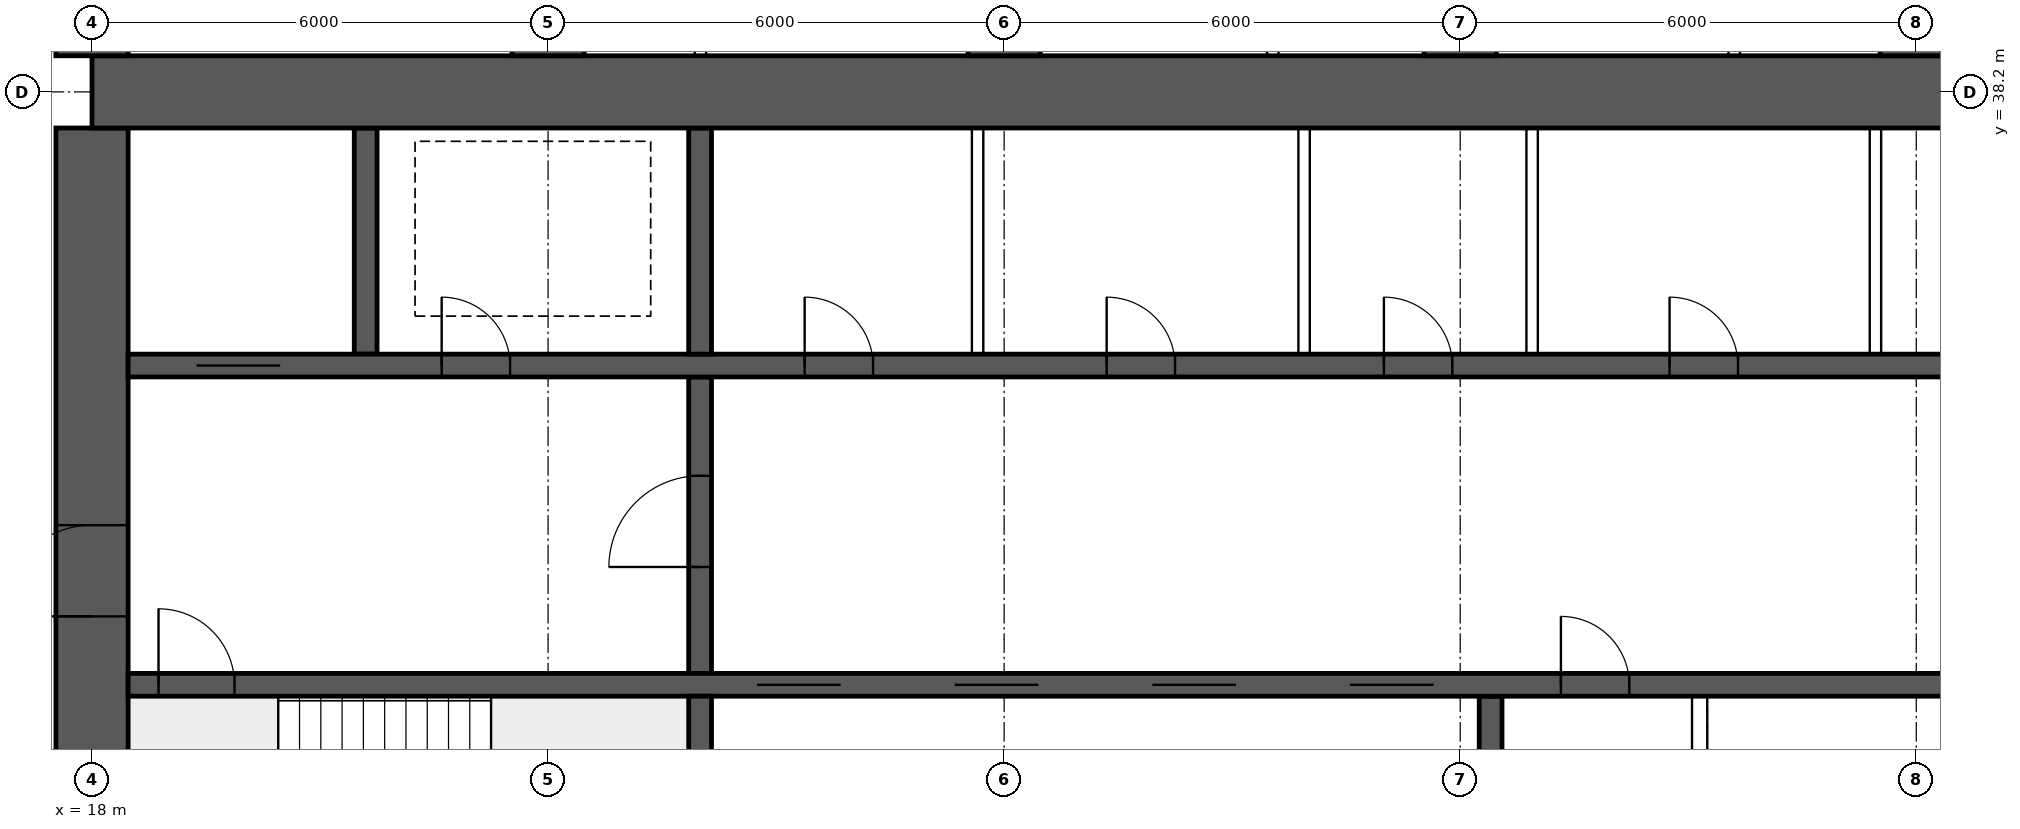
"""IFC4 building model, lengths in metres.
Left out: names, types, materials, properties, quantities, classifications, styles, units other than length and angle.
Written with IfcOpenShell. Run it as: python <this file> out.ifc"""

import sys

from ifc_helpers import new_model, si_unit, direction, frame, frame_2d, origin, place, context, subcontext, project, spatial, rectangle, extrude, element, fill, save


model = new_model("IFC4")
c1 = context("Model", 3, precision=1e-05, world=origin(), true_north=direction((0.0, 1.0)))
c2 = subcontext(c1, "Body", "Model", "MODEL_VIEW")
j1 = project(units=[si_unit("LENGTHUNIT", "METRE"), si_unit("PLANEANGLEUNIT", "RADIAN")], contexts=[c1])
p1 = place(None, origin())
s1 = spatial("IfcSite", under=j1, at=p1, CompositionType="ELEMENT")
p2 = place(p1, origin())
s2 = spatial("IfcBuilding", under=s1, at=p2, CompositionType="ELEMENT")
p3 = place(p2, frame((0.0, 0.0, 125.65)))
s3 = spatial("IfcBuildingStorey", under=s2, at=p3, CompositionType="ELEMENT", Elevation=125.65)
p4 = place(p3, frame((18.0, 38.2, 0.0), z_axis=(0.0, 0.0, 1.0), x_axis=(1.0, 0.0, 0.0)))
e1 = element("IfcWall", 1, at=p4, inside=s3, PredefinedType="SHEAR", context=c2, shape_type="SweptSolid", body=[
    extrude(rectangle(XDim=48.0, YDim=0.95, at=frame_2d((24.0, 0.0))), origin(), (0.0, 0.0, 1.0), 3.75),
])
p5 = place(p3, frame((18.0, 26.275, 0.0), z_axis=(0.0, 0.0, 1.0), x_axis=(0.0, 1.0, 0.0)))
e2 = element("IfcWall", 2, at=p5, inside=s3, PredefinedType="SHEAR", context=c2, shape_type="SweptSolid", body=[
    extrude(rectangle(XDim=11.45, YDim=0.95, at=frame_2d((5.725, 0.0))), origin(), (0.0, 0.0, 1.0), 3.75),
])
p6 = place(p5, frame((5.025, 0.0, 0.0)))
e3 = element("IfcOpeningElement", 3, at=p6, cuts=e2, PredefinedType="OPENING", context=c2, shape_type="SweptSolid", body=[
    extrude(rectangle(XDim=1.2, YDim=2.1, at=frame_2d((0.6, 1.05))), frame((0.0, 0.485, 0.0), z_axis=(0.0, -1.0, 0.0), x_axis=(1.0, 0.0, 0.0)), (0.0, 0.0, 1.0), 0.97),
])
p7 = place(p3, frame((18.475, 30.4, 0.0), z_axis=(0.0, 0.0, 1.0), x_axis=(1.0, 0.0, 0.0)))
e4 = element("IfcWall", 4, at=p7, inside=s3, PredefinedType="SHEAR", context=c2, shape_type="SweptSolid", body=[
    extrude(rectangle(XDim=47.05, YDim=0.3, at=frame_2d((23.525, 0.0))), origin(), (0.0, 0.0, 1.0), 3.75),
])
p8 = place(p7, frame((0.4, 0.0, 0.0)))
e5 = element("IfcOpeningElement", 5, at=p8, cuts=e4, PredefinedType="OPENING", context=c2, shape_type="SweptSolid", body=[
    extrude(rectangle(XDim=1.0, YDim=2.1, at=frame_2d((0.5, 1.05))), frame((0.0, 0.16, 0.0), z_axis=(0.0, -1.0, 0.0), x_axis=(1.0, 0.0, 0.0)), (0.0, 0.0, 1.0), 0.32),
])
p9 = place(p7, frame((45.65, 0.0, 0.0)))
e6 = element("IfcOpeningElement", 6, at=p9, cuts=e4, PredefinedType="OPENING", context=c2, shape_type="SweptSolid", body=[
    extrude(rectangle(XDim=1.0, YDim=2.1, at=frame_2d((0.5, 1.05))), frame((0.0, 0.16, 0.0), z_axis=(0.0, -1.0, 0.0), x_axis=(1.0, 0.0, 0.0)), (0.0, 0.0, 1.0), 0.32),
])
p10 = place(p7, frame((8.275, 0.0, 0.0)))
e7 = element("IfcOpeningElement", 7, at=p10, cuts=e4, PredefinedType="OPENING", context=c2, shape_type="SweptSolid", body=[
    extrude(rectangle(XDim=1.1, YDim=2.1, at=frame_2d((0.55, 1.05))), frame((0.0, 0.16, 0.0), z_axis=(0.0, -1.0, 0.0), x_axis=(1.0, 0.0, 0.0)), (0.0, 0.0, 1.0), 0.32),
])
p11 = place(p7, frame((10.875, 0.0, 0.0)))
e8 = element("IfcOpeningElement", 8, at=p11, cuts=e4, PredefinedType="OPENING", context=c2, shape_type="SweptSolid", body=[
    extrude(rectangle(XDim=1.1, YDim=2.1, at=frame_2d((0.55, 1.05))), frame((0.0, 0.16, 0.0), z_axis=(0.0, -1.0, 0.0), x_axis=(1.0, 0.0, 0.0)), (0.0, 0.0, 1.0), 0.32),
])
p12 = place(p7, frame((13.475, 0.0, 0.0)))
e9 = element("IfcOpeningElement", 9, at=p12, cuts=e4, PredefinedType="OPENING", context=c2, shape_type="SweptSolid", body=[
    extrude(rectangle(XDim=1.1, YDim=2.1, at=frame_2d((0.55, 1.05))), frame((0.0, 0.16, 0.0), z_axis=(0.0, -1.0, 0.0), x_axis=(1.0, 0.0, 0.0)), (0.0, 0.0, 1.0), 0.32),
])
p13 = place(p7, frame((16.075, 0.0, 0.0)))
e10 = element("IfcOpeningElement", 10, at=p13, cuts=e4, PredefinedType="OPENING", context=c2, shape_type="SweptSolid", body=[
    extrude(rectangle(XDim=1.1, YDim=2.1, at=frame_2d((0.55, 1.05))), frame((0.0, 0.16, 0.0), z_axis=(0.0, -1.0, 0.0), x_axis=(1.0, 0.0, 0.0)), (0.0, 0.0, 1.0), 0.32),
])
p14 = place(p7, frame((18.85, 0.0, 0.0)))
e11 = element("IfcOpeningElement", 11, at=p14, cuts=e4, PredefinedType="OPENING", context=c2, shape_type="SweptSolid", body=[
    extrude(rectangle(XDim=0.9, YDim=2.1, at=frame_2d((0.45, 1.05))), frame((0.0, 0.16, 0.0), z_axis=(0.0, -1.0, 0.0), x_axis=(1.0, 0.0, 0.0)), (0.0, 0.0, 1.0), 0.32),
])
p15 = place(p7, frame((30.142, 0.0, 0.0)))
e12 = element("IfcOpeningElement", 12, at=p15, cuts=e4, PredefinedType="OPENING", context=c2, shape_type="SweptSolid", body=[
    extrude(rectangle(XDim=1.1, YDim=2.1, at=frame_2d((0.55, 1.05))), frame((0.0, 0.16, 0.0), z_axis=(0.0, -1.0, 0.0), x_axis=(1.0, 0.0, 0.0)), (0.0, 0.0, 1.0), 0.32),
])
p16 = place(p7, frame((33.675, 0.0, 0.0)))
e13 = element("IfcOpeningElement", 13, at=p16, cuts=e4, PredefinedType="OPENING", context=c2, shape_type="SweptSolid", body=[
    extrude(rectangle(XDim=1.1, YDim=2.1, at=frame_2d((0.55, 1.05))), frame((0.0, 0.16, 0.0), z_axis=(0.0, -1.0, 0.0), x_axis=(1.0, 0.0, 0.0)), (0.0, 0.0, 1.0), 0.32),
])
p17 = place(p7, frame((37.208, 0.0, 0.0)))
e14 = element("IfcOpeningElement", 14, at=p17, cuts=e4, PredefinedType="OPENING", context=c2, shape_type="SweptSolid", body=[
    extrude(rectangle(XDim=1.1, YDim=2.1, at=frame_2d((0.55, 1.05))), frame((0.0, 0.16, 0.0), z_axis=(0.0, -1.0, 0.0), x_axis=(1.0, 0.0, 0.0)), (0.0, 0.0, 1.0), 0.32),
])
p18 = place(p3, frame((18.475, 34.6, 0.0), z_axis=(0.0, 0.0, 1.0), x_axis=(1.0, 0.0, 0.0)))
e15 = element("IfcWall", 15, at=p18, inside=s3, PredefinedType="SHEAR", context=c2, shape_type="SweptSolid", body=[
    extrude(rectangle(XDim=47.05, YDim=0.3, at=frame_2d((23.525, 0.0))), origin(), (0.0, 0.0, 1.0), 3.75),
])
p19 = place(p18, frame((0.9, 0.0, 0.0)))
e16 = element("IfcOpeningElement", 16, at=p19, cuts=e15, PredefinedType="OPENING", context=c2, shape_type="SweptSolid", body=[
    extrude(rectangle(XDim=1.1, YDim=2.1, at=frame_2d((0.55, 1.05))), frame((0.0, 0.16, 0.0), z_axis=(0.0, -1.0, 0.0), x_axis=(1.0, 0.0, 0.0)), (0.0, 0.0, 1.0), 0.32),
])
p20 = place(p18, frame((45.05, 0.0, 0.0)))
e17 = element("IfcOpeningElement", 17, at=p20, cuts=e15, PredefinedType="OPENING", context=c2, shape_type="SweptSolid", body=[
    extrude(rectangle(XDim=1.1, YDim=2.1, at=frame_2d((0.55, 1.05))), frame((0.0, 0.16, 0.0), z_axis=(0.0, -1.0, 0.0), x_axis=(1.0, 0.0, 0.0)), (0.0, 0.0, 1.0), 0.32),
])
p21 = place(p18, frame((4.125, 0.0, 0.0)))
e18 = element("IfcOpeningElement", 18, at=p21, cuts=e15, PredefinedType="OPENING", context=c2, shape_type="SweptSolid", body=[
    extrude(rectangle(XDim=0.9, YDim=2.1, at=frame_2d((0.45, 1.05))), frame((0.0, 0.16, 0.0), z_axis=(0.0, -1.0, 0.0), x_axis=(1.0, 0.0, 0.0)), (0.0, 0.0, 1.0), 0.32),
])
p22 = place(p18, frame((42.025, 0.0, 0.0)))
e19 = element("IfcOpeningElement", 19, at=p22, cuts=e15, PredefinedType="OPENING", context=c2, shape_type="SweptSolid", body=[
    extrude(rectangle(XDim=0.9, YDim=2.1, at=frame_2d((0.45, 1.05))), frame((0.0, 0.16, 0.0), z_axis=(0.0, -1.0, 0.0), x_axis=(1.0, 0.0, 0.0)), (0.0, 0.0, 1.0), 0.32),
])
p23 = place(p18, frame((8.9, 0.0, 0.0)))
e20 = element("IfcOpeningElement", 20, at=p23, cuts=e15, PredefinedType="OPENING", context=c2, shape_type="SweptSolid", body=[
    extrude(rectangle(XDim=0.9, YDim=2.1, at=frame_2d((0.45, 1.05))), frame((0.0, 0.16, 0.0), z_axis=(0.0, -1.0, 0.0), x_axis=(1.0, 0.0, 0.0)), (0.0, 0.0, 1.0), 0.32),
])
p24 = place(p18, frame((12.874, 0.0, 0.0)))
e21 = element("IfcOpeningElement", 21, at=p24, cuts=e15, PredefinedType="OPENING", context=c2, shape_type="SweptSolid", body=[
    extrude(rectangle(XDim=0.9, YDim=2.1, at=frame_2d((0.45, 1.05))), frame((0.0, 0.16, 0.0), z_axis=(0.0, -1.0, 0.0), x_axis=(1.0, 0.0, 0.0)), (0.0, 0.0, 1.0), 0.32),
])
p25 = place(p18, frame((16.521, 0.0, 0.0)))
e22 = element("IfcOpeningElement", 22, at=p25, cuts=e15, PredefinedType="OPENING", context=c2, shape_type="SweptSolid", body=[
    extrude(rectangle(XDim=0.9, YDim=2.1, at=frame_2d((0.45, 1.05))), frame((0.0, 0.16, 0.0), z_axis=(0.0, -1.0, 0.0), x_axis=(1.0, 0.0, 0.0)), (0.0, 0.0, 1.0), 0.32),
])
p26 = place(p18, frame((20.28, 0.0, 0.0)))
e23 = element("IfcOpeningElement", 23, at=p26, cuts=e15, PredefinedType="OPENING", context=c2, shape_type="SweptSolid", body=[
    extrude(rectangle(XDim=0.9, YDim=2.1, at=frame_2d((0.45, 1.05))), frame((0.0, 0.16, 0.0), z_axis=(0.0, -1.0, 0.0), x_axis=(1.0, 0.0, 0.0)), (0.0, 0.0, 1.0), 0.32),
])
p27 = place(p18, frame((24.686, 0.0, 0.0)))
e24 = element("IfcOpeningElement", 24, at=p27, cuts=e15, PredefinedType="OPENING", context=c2, shape_type="SweptSolid", body=[
    extrude(rectangle(XDim=0.9, YDim=2.1, at=frame_2d((0.45, 1.05))), frame((0.0, 0.16, 0.0), z_axis=(0.0, -1.0, 0.0), x_axis=(1.0, 0.0, 0.0)), (0.0, 0.0, 1.0), 0.32),
])
p28 = place(p18, frame((27.483, 0.0, 0.0)))
e25 = element("IfcOpeningElement", 25, at=p28, cuts=e15, PredefinedType="OPENING", context=c2, shape_type="SweptSolid", body=[
    extrude(rectangle(XDim=0.9, YDim=2.1, at=frame_2d((0.45, 1.05))), frame((0.0, 0.16, 0.0), z_axis=(0.0, -1.0, 0.0), x_axis=(1.0, 0.0, 0.0)), (0.0, 0.0, 1.0), 0.32),
])
p29 = place(p18, frame((29.45, 0.0, 0.0)))
e26 = element("IfcOpeningElement", 26, at=p29, cuts=e15, PredefinedType="OPENING", context=c2, shape_type="SweptSolid", body=[
    extrude(rectangle(XDim=0.9, YDim=2.1, at=frame_2d((0.45, 1.05))), frame((0.0, 0.16, 0.0), z_axis=(0.0, -1.0, 0.0), x_axis=(1.0, 0.0, 0.0)), (0.0, 0.0, 1.0), 0.32),
])
p30 = place(p18, frame((31.882, 0.0, 0.0)))
e27 = element("IfcOpeningElement", 27, at=p30, cuts=e15, PredefinedType="OPENING", context=c2, shape_type="SweptSolid", body=[
    extrude(rectangle(XDim=0.9, YDim=2.1, at=frame_2d((0.45, 1.05))), frame((0.0, 0.16, 0.0), z_axis=(0.0, -1.0, 0.0), x_axis=(1.0, 0.0, 0.0)), (0.0, 0.0, 1.0), 0.32),
])
p31 = place(p18, frame((34.617, 0.0, 0.0)))
e28 = element("IfcOpeningElement", 28, at=p31, cuts=e15, PredefinedType="OPENING", context=c2, shape_type="SweptSolid", body=[
    extrude(rectangle(XDim=0.9, YDim=2.1, at=frame_2d((0.45, 1.05))), frame((0.0, 0.16, 0.0), z_axis=(0.0, -1.0, 0.0), x_axis=(1.0, 0.0, 0.0)), (0.0, 0.0, 1.0), 0.32),
])
p32 = place(p18, frame((37.656, 0.0, 0.0)))
e29 = element("IfcOpeningElement", 29, at=p32, cuts=e15, PredefinedType="OPENING", context=c2, shape_type="SweptSolid", body=[
    extrude(rectangle(XDim=0.9, YDim=2.1, at=frame_2d((0.45, 1.05))), frame((0.0, 0.16, 0.0), z_axis=(0.0, -1.0, 0.0), x_axis=(1.0, 0.0, 0.0)), (0.0, 0.0, 1.0), 0.32),
])
p33 = place(p3, frame((26.0, 26.275, 0.0), z_axis=(0.0, 0.0, 1.0), x_axis=(0.0, 1.0, 0.0)))
e30 = element("IfcWall", 30, at=p33, inside=s3, PredefinedType="SHEAR", context=c2, shape_type="SweptSolid", body=[
    extrude(rectangle(XDim=3.975, YDim=0.3, at=frame_2d((1.988, 0.0))), origin(), (0.0, 0.0, 1.0), 3.75),
])
p34 = place(p3, frame((26.0, 30.55, 0.0), z_axis=(0.0, 0.0, 1.0), x_axis=(0.0, 1.0, 0.0)))
e31 = element("IfcWall", 31, at=p34, inside=s3, PredefinedType="SHEAR", context=c2, shape_type="SweptSolid", body=[
    extrude(rectangle(XDim=3.9, YDim=0.3, at=frame_2d((1.95, 0.0))), origin(), (0.0, 0.0, 1.0), 3.75),
])
p35 = place(p34, frame((1.4, 0.0, 0.0)))
e32 = element("IfcOpeningElement", 32, at=p35, cuts=e31, PredefinedType="OPENING", context=c2, shape_type="SweptSolid", body=[
    extrude(rectangle(XDim=1.2, YDim=2.1, at=frame_2d((0.6, 1.05))), frame((0.0, 0.16, 0.0), z_axis=(0.0, -1.0, 0.0), x_axis=(1.0, 0.0, 0.0)), (0.0, 0.0, 1.0), 0.32),
])
for number, where, z_axis, x_axis in (
    (33, (21.6, 34.75, 0.0), (0.0, 0.0, 1.0), (0.0, 1.0, 0.0)),
    (34, (26.0, 34.75, 0.0), (0.0, 0.0, 1.0), (0.0, 1.0, 0.0)),
):
    element("IfcWall", number, at=place(p3, frame(where, z_axis=z_axis, x_axis=x_axis)), inside=s3, PredefinedType="SHEAR", context=c2, shape_type="SweptSolid", body=[
        extrude(rectangle(XDim=2.975, YDim=0.3, at=frame_2d((1.488, 0.0))), origin(), (0.0, 0.0, 1.0), 3.75),
    ])
p36 = place(p3, frame((36.4, 26.275, 0.0), z_axis=(0.0, 0.0, 1.0), x_axis=(0.0, 1.0, 0.0)))
e35 = element("IfcWall", 35, at=p36, inside=s3, PredefinedType="SHEAR", context=c2, shape_type="SweptSolid", body=[
    extrude(rectangle(XDim=3.975, YDim=0.3, at=frame_2d((1.988, 0.0))), origin(), (0.0, 0.0, 1.0), 3.75),
])
for number, where, z_axis, x_axis in (
    (36, (18.0, 38.675, 0.0), (0.0, 0.0, 1.0), (0.0, 1.0, 0.0)),
    (37, (24.0, 38.675, 0.0), (0.0, 0.0, 1.0), (0.0, 1.0, 0.0)),
    (38, (30.0, 38.675, 0.0), (0.0, 0.0, 1.0), (0.0, 1.0, 0.0)),
    (39, (36.0, 38.675, 0.0), (0.0, 0.0, 1.0), (0.0, 1.0, 0.0)),
    (40, (42.0, 38.675, 0.0), (0.0, 0.0, 1.0), (0.0, 1.0, 0.0)),
):
    element("IfcWall", number, at=place(p3, frame(where, z_axis=z_axis, x_axis=x_axis)), inside=s3, PredefinedType="SHEAR", context=c2, shape_type="SweptSolid", body=[
        extrude(rectangle(XDim=9.325, YDim=0.95, at=frame_2d((4.663, 0.0))), origin(), (0.0, 0.0, 1.0), 3.75),
    ])
for number, where, z_axis, x_axis in (
    (41, (29.651, 34.75, 0.0), (0.0, 0.0, 1.0), (0.0, 1.0, 0.0)),
    (42, (33.946, 34.75, 0.0), (0.0, 0.0, 1.0), (0.0, 1.0, 0.0)),
    (43, (36.946, 34.75, 0.0), (0.0, 0.0, 1.0), (0.0, 1.0, 0.0)),
    (44, (41.463, 34.75, 0.0), (0.0, 0.0, 1.0), (0.0, 1.0, 0.0)),
):
    element("IfcWall", number, at=place(p3, frame(where, z_axis=z_axis, x_axis=x_axis)), inside=s3, PredefinedType="SOLIDWALL", context=c2, shape_type="SweptSolid", body=[
        extrude(rectangle(XDim=2.975, YDim=0.15, at=frame_2d((1.488, 0.0))), origin(), (0.0, 0.0, 1.0), 3.5),
    ])
p37 = place(p3, frame((39.15, 26.275, 0.0), z_axis=(0.0, 0.0, 1.0), x_axis=(0.0, 1.0, 0.0)))
e45 = element("IfcWall", 45, at=p37, inside=s3, PredefinedType="SOLIDWALL", context=c2, shape_type="SweptSolid", body=[
    extrude(rectangle(XDim=3.975, YDim=0.2, at=frame_2d((1.988, 0.0))), origin(), (0.0, 0.0, 1.0), 3.5),
])
for number, where, z_axis, x_axis in (
    (46, (26.005, 38.675, 0.0), (0.0, 0.0, 1.0), (0.0, 1.0, 0.0)),
    (47, (33.535, 38.675, 0.0), (0.0, 0.0, 1.0), (0.0, 1.0, 0.0)),
    (48, (39.605, 38.675, 0.0), (0.0, 0.0, 1.0), (0.0, 1.0, 0.0)),
):
    element("IfcWall", number, at=place(p3, frame(where, z_axis=z_axis, x_axis=x_axis)), inside=s3, PredefinedType="PARTITIONING", context=c2, shape_type="SweptSolid", body=[
        extrude(rectangle(XDim=9.225, YDim=0.15, at=frame_2d((4.612, 0.0))), origin(), (0.0, 0.0, 1.0), 3.5),
    ])
p38 = place(p6, origin())
e49 = element("IfcDoor", 49, at=p38, inside=s3, OperationType="SINGLE_SWING_LEFT", PredefinedType="DOOR", context=c2, shape_type="SweptSolid", body=[
    extrude(rectangle(XDim=1.2, YDim=2.1, at=frame_2d((0.6, 1.05))), frame((0.0, 0.025, 0.0), z_axis=(0.0, -1.0, 0.0), x_axis=(1.0, 0.0, 0.0)), (0.0, 0.0, 1.0), 0.05),
])
fill(e3, e49)
p39 = place(p8, origin())
e50 = element("IfcDoor", 50, at=p39, inside=s3, OperationType="SINGLE_SWING_LEFT", PredefinedType="DOOR", context=c2, shape_type="SweptSolid", body=[
    extrude(rectangle(XDim=1.0, YDim=2.1, at=frame_2d((0.5, 1.05))), frame((0.0, 0.025, 0.0), z_axis=(0.0, -1.0, 0.0), x_axis=(1.0, 0.0, 0.0)), (0.0, 0.0, 1.0), 0.05),
])
fill(e5, e50)
p40 = place(p19, origin())
e51 = element("IfcDoor", 51, at=p40, inside=s3, OperationType="DOUBLE_DOOR_SLIDING", PredefinedType="DOOR", context=c2, shape_type="SweptSolid", body=[
    extrude(rectangle(XDim=1.1, YDim=2.1, at=frame_2d((0.55, 1.05))), frame((0.0, 0.025, 0.0), z_axis=(0.0, -1.0, 0.0), x_axis=(1.0, 0.0, 0.0)), (0.0, 0.0, 1.0), 0.05),
])
fill(e16, e51)
p41 = place(p21, origin())
e52 = element("IfcDoor", 52, at=p41, inside=s3, OperationType="SINGLE_SWING_LEFT", PredefinedType="DOOR", context=c2, shape_type="SweptSolid", body=[
    extrude(rectangle(XDim=0.9, YDim=2.1, at=frame_2d((0.45, 1.05))), frame((0.0, 0.025, 0.0), z_axis=(0.0, -1.0, 0.0), x_axis=(1.0, 0.0, 0.0)), (0.0, 0.0, 1.0), 0.05),
])
fill(e18, e52)
p42 = place(p35, origin())
e53 = element("IfcDoor", 53, at=p42, inside=s3, OperationType="SINGLE_SWING_LEFT", PredefinedType="DOOR", context=c2, shape_type="SweptSolid", body=[
    extrude(rectangle(XDim=1.2, YDim=2.1, at=frame_2d((0.6, 1.05))), frame((0.0, 0.025, 0.0), z_axis=(0.0, -1.0, 0.0), x_axis=(1.0, 0.0, 0.0)), (0.0, 0.0, 1.0), 0.05),
])
fill(e32, e53)
p43 = place(p23, origin())
e54 = element("IfcDoor", 54, at=p43, inside=s3, OperationType="SINGLE_SWING_LEFT", PredefinedType="DOOR", context=c2, shape_type="SweptSolid", body=[
    extrude(rectangle(XDim=0.9, YDim=2.1, at=frame_2d((0.45, 1.05))), frame((0.0, 0.025, 0.0), z_axis=(0.0, -1.0, 0.0), x_axis=(1.0, 0.0, 0.0)), (0.0, 0.0, 1.0), 0.05),
])
fill(e20, e54)
p44 = place(p24, origin())
e55 = element("IfcDoor", 55, at=p44, inside=s3, OperationType="SINGLE_SWING_LEFT", PredefinedType="DOOR", context=c2, shape_type="SweptSolid", body=[
    extrude(rectangle(XDim=0.9, YDim=2.1, at=frame_2d((0.45, 1.05))), frame((0.0, 0.025, 0.0), z_axis=(0.0, -1.0, 0.0), x_axis=(1.0, 0.0, 0.0)), (0.0, 0.0, 1.0), 0.05),
])
fill(e21, e55)
p45 = place(p25, origin())
e56 = element("IfcDoor", 56, at=p45, inside=s3, OperationType="SINGLE_SWING_LEFT", PredefinedType="DOOR", context=c2, shape_type="SweptSolid", body=[
    extrude(rectangle(XDim=0.9, YDim=2.1, at=frame_2d((0.45, 1.05))), frame((0.0, 0.025, 0.0), z_axis=(0.0, -1.0, 0.0), x_axis=(1.0, 0.0, 0.0)), (0.0, 0.0, 1.0), 0.05),
])
fill(e22, e56)
p46 = place(p26, origin())
e57 = element("IfcDoor", 57, at=p46, inside=s3, OperationType="SINGLE_SWING_LEFT", PredefinedType="DOOR", context=c2, shape_type="SweptSolid", body=[
    extrude(rectangle(XDim=0.9, YDim=2.1, at=frame_2d((0.45, 1.05))), frame((0.0, 0.025, 0.0), z_axis=(0.0, -1.0, 0.0), x_axis=(1.0, 0.0, 0.0)), (0.0, 0.0, 1.0), 0.05),
])
fill(e23, e57)
p47 = place(p10, origin())
e58 = element("IfcDoor", 58, at=p47, inside=s3, OperationType="DOUBLE_DOOR_SLIDING", PredefinedType="DOOR", context=c2, shape_type="SweptSolid", body=[
    extrude(rectangle(XDim=1.1, YDim=2.1, at=frame_2d((0.55, 1.05))), frame((0.0, 0.025, 0.0), z_axis=(0.0, -1.0, 0.0), x_axis=(1.0, 0.0, 0.0)), (0.0, 0.0, 1.0), 0.05),
])
fill(e7, e58)
p48 = place(p11, origin())
e59 = element("IfcDoor", 59, at=p48, inside=s3, OperationType="DOUBLE_DOOR_SLIDING", PredefinedType="DOOR", context=c2, shape_type="SweptSolid", body=[
    extrude(rectangle(XDim=1.1, YDim=2.1, at=frame_2d((0.55, 1.05))), frame((0.0, 0.025, 0.0), z_axis=(0.0, -1.0, 0.0), x_axis=(1.0, 0.0, 0.0)), (0.0, 0.0, 1.0), 0.05),
])
fill(e8, e59)
p49 = place(p12, origin())
e60 = element("IfcDoor", 60, at=p49, inside=s3, OperationType="DOUBLE_DOOR_SLIDING", PredefinedType="DOOR", context=c2, shape_type="SweptSolid", body=[
    extrude(rectangle(XDim=1.1, YDim=2.1, at=frame_2d((0.55, 1.05))), frame((0.0, 0.025, 0.0), z_axis=(0.0, -1.0, 0.0), x_axis=(1.0, 0.0, 0.0)), (0.0, 0.0, 1.0), 0.05),
])
fill(e9, e60)
p50 = place(p13, origin())
e61 = element("IfcDoor", 61, at=p50, inside=s3, OperationType="DOUBLE_DOOR_SLIDING", PredefinedType="DOOR", context=c2, shape_type="SweptSolid", body=[
    extrude(rectangle(XDim=1.1, YDim=2.1, at=frame_2d((0.55, 1.05))), frame((0.0, 0.025, 0.0), z_axis=(0.0, -1.0, 0.0), x_axis=(1.0, 0.0, 0.0)), (0.0, 0.0, 1.0), 0.05),
])
fill(e10, e61)
p51 = place(p14, origin())
e62 = element("IfcDoor", 62, at=p51, inside=s3, OperationType="SINGLE_SWING_LEFT", PredefinedType="DOOR", context=c2, shape_type="SweptSolid", body=[
    extrude(rectangle(XDim=0.9, YDim=2.1, at=frame_2d((0.45, 1.05))), frame((0.0, 0.025, 0.0), z_axis=(0.0, -1.0, 0.0), x_axis=(1.0, 0.0, 0.0)), (0.0, 0.0, 1.0), 0.05),
])
fill(e11, e62)
save(model, sys.argv[1])
